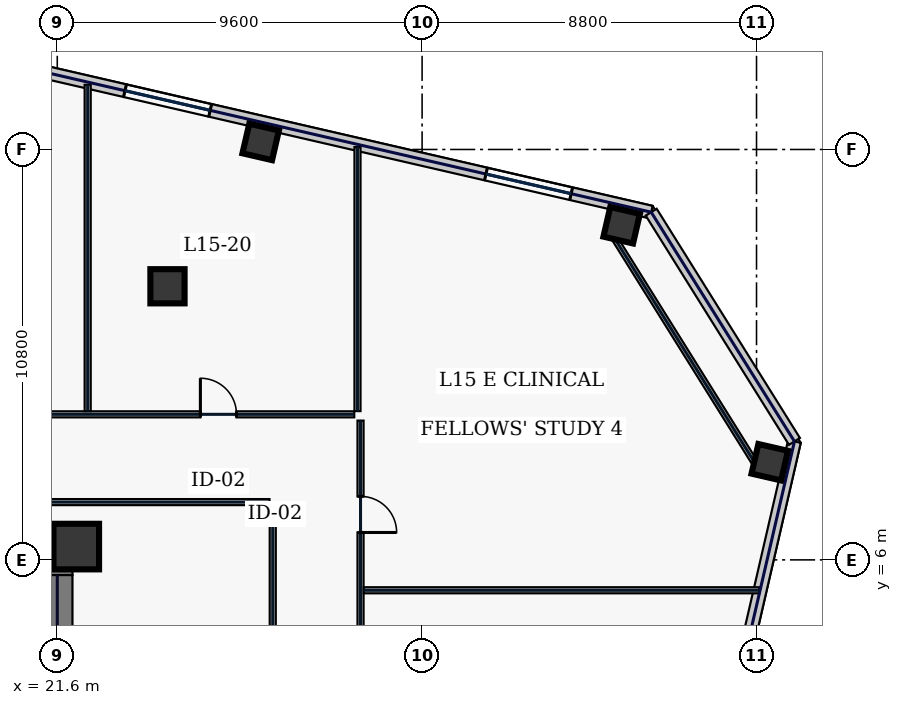
"""IFC4 building model, lengths in metres.
Left out: names, types, materials, properties, quantities, classifications, styles, units other than length and angle.
Written with IfcOpenShell. Run it as: python <this file> out.ifc"""

import sys

from ifc_helpers import new_model, si_unit, direction, frame, frame_2d, origin, origin_2d, place, context, subcontext, project, spatial, rectangle, hollow_rectangle, extrude, element, fill, save


model = new_model("IFC4")
c1 = context("Model", 3, precision=1e-05, world=origin(), true_north=direction((0.0, 1.0)))
c2 = subcontext(c1, "Body", "Model", "MODEL_VIEW")
j1 = project(units=[si_unit("LENGTHUNIT", "METRE"), si_unit("PLANEANGLEUNIT", "RADIAN")], contexts=[c1])
p1 = place(None, origin())
s1 = spatial("IfcSite", under=j1, at=p1, CompositionType="ELEMENT")
p2 = place(p1, origin())
s2 = spatial("IfcBuilding", under=s1, at=p2, CompositionType="ELEMENT")
p3 = place(p2, frame((0.0, 0.0, 71.4)))
s3 = spatial("IfcBuildingStorey", under=s2, at=p3, CompositionType="ELEMENT", Elevation=71.4)
p4 = place(p3, frame((10.4, 6.0, 0.0), z_axis=(0.0, 0.0, 1.0), x_axis=(1.0, 0.0, 0.0)))
e1 = element("IfcWall", 1, at=p4, inside=s3, PredefinedType="SHEAR", context=c2, shape_type="SweptSolid", body=[
    extrude(rectangle(XDim=11.6, YDim=0.8, at=frame_2d((5.8, 0.0))), origin(), (0.0, 0.0, 1.0), 3.74),
])
p5 = place(p3, frame((21.6, -5.6, 0.0), z_axis=(0.0, 0.0, 1.0), x_axis=(0.0, 1.0, 0.0)))
e2 = element("IfcWall", 2, at=p5, inside=s3, PredefinedType="SHEAR", context=c2, shape_type="SweptSolid", body=[
    extrude(rectangle(XDim=11.2, YDim=0.8, at=frame_2d((5.6, 0.0))), origin(), (0.0, 0.0, 1.0), 3.74),
])
p6 = place(p3, frame((22.1, 6.35, 0.0), z_axis=(0.0, 0.0, 1.0), x_axis=(1.0, 0.0, 0.0)))
e3 = element("IfcColumn", 3, at=p6, inside=s3, PredefinedType="COLUMN", context=c2, shape_type="SweptSolid", body=[
    extrude(hollow_rectangle(XDim=1.2, YDim=1.2, WallThickness=0.05, at=origin_2d()), origin(), (0.0, 0.0, 1.0), 3.74),
])
p7 = place(p3, frame((24.5, 13.2, 0.0), z_axis=(0.0, 0.0, 1.0), x_axis=(1.0, 0.0, 0.0)))
e4 = element("IfcColumn", 4, at=p7, inside=s3, PredefinedType="COLUMN", context=c2, shape_type="SweptSolid", body=[
    extrude(hollow_rectangle(XDim=0.9, YDim=0.9, WallThickness=0.04, at=origin_2d()), origin(), (0.0, 0.0, 1.0), 3.74),
])
for number, where, z_axis, x_axis in (
    (5, (36.451, 14.806, 0.0), (0.0, 0.0, 1.0), (0.974, -0.225, 0.0)),
    (6, (26.952, 16.999, 0.0), (0.0, 0.0, 1.0), (0.974, -0.225, 0.0)),
    (7, (40.348, 8.57, 0.0), (0.0, 0.0, 1.0), (0.974, -0.225, 0.0)),
):
    element("IfcColumn", number, at=place(p3, frame(where, z_axis=z_axis, x_axis=x_axis)), inside=s3, PredefinedType="COLUMN", context=c2, shape_type="SweptSolid", body=[
        extrude(hollow_rectangle(XDim=0.8, YDim=0.8, WallThickness=0.036, at=origin_2d()), origin(), (0.0, 0.0, 1.0), 3.74),
    ])
p8 = place(p3, frame((37.229, 15.15, 0.0), z_axis=(0.0, 0.0, 1.0), x_axis=(-0.974368689865, 0.224957009695, 0.0)))
e8 = element("IfcWall", 8, at=p8, inside=s3, PredefinedType="STANDARD", context=c2, shape_type="SweptSolid", body=[
    extrude(rectangle(XDim=19.75, YDim=0.34, at=frame_2d((9.875, 0.0))), origin(), (0.0, 0.0, 1.0), 3.74),
])
p9 = place(p8, frame((16.395, 0.0, 0.77)))
e9 = element("IfcOpeningElement", 9, at=p9, cuts=e8, PredefinedType="OPENING", context=c2, shape_type="SweptSolid", body=[
    extrude(rectangle(XDim=2.3, YDim=2.1, at=frame_2d((1.15, 1.05))), frame((0.0, 0.18, 0.0), z_axis=(0.0, -1.0, 0.0), x_axis=(1.0, 0.0, 0.0)), (0.0, 0.0, 1.0), 0.36),
])
p10 = place(p8, frame((11.911, 0.0, 0.77)))
e10 = element("IfcOpeningElement", 10, at=p10, cuts=e8, PredefinedType="OPENING", context=c2, shape_type="SweptSolid", body=[
    extrude(rectangle(XDim=2.3, YDim=2.1, at=frame_2d((1.15, 1.05))), frame((0.0, 0.18, 0.0), z_axis=(0.0, -1.0, 0.0), x_axis=(1.0, 0.0, 0.0)), (0.0, 0.0, 1.0), 0.36),
])
p11 = place(p8, frame((2.162, 0.0, 0.77)))
e11 = element("IfcOpeningElement", 11, at=p11, cuts=e8, PredefinedType="OPENING", context=c2, shape_type="SweptSolid", body=[
    extrude(rectangle(XDim=2.3, YDim=2.1, at=frame_2d((1.15, 1.05))), frame((0.0, 0.18, 0.0), z_axis=(0.0, -1.0, 0.0), x_axis=(1.0, 0.0, 0.0)), (0.0, 0.0, 1.0), 0.36),
])
p12 = place(p3, frame((31.82, -30.637, 0.0), z_axis=(0.0, 0.0, 1.0), x_axis=(0.224949969076, 0.974370315338, 0.0)))
e12 = element("IfcWall", 12, at=p12, inside=s3, PredefinedType="STANDARD", context=c2, shape_type="SweptSolid", body=[
    extrude(rectangle(XDim=40.8, YDim=0.34, at=frame_2d((20.4, 0.0))), origin(), (0.0, 0.0, 1.0), 3.74),
])
p13 = place(p12, frame((4.3, 0.0, 0.58)))
e13 = element("IfcOpeningElement", 13, at=p13, cuts=e12, PredefinedType="OPENING", context=c2, shape_type="SweptSolid", body=[
    extrude(rectangle(XDim=1.6, YDim=2.3, at=frame_2d((0.8, 1.15))), frame((0.0, 0.18, 0.0), z_axis=(0.0, -1.0, 0.0), x_axis=(1.0, 0.0, 0.0)), (0.0, 0.0, 1.0), 0.36),
])
p14 = place(p12, frame((14.5, 0.0, 0.58)))
e14 = element("IfcOpeningElement", 14, at=p14, cuts=e12, PredefinedType="OPENING", context=c2, shape_type="SweptSolid", body=[
    extrude(rectangle(XDim=1.6, YDim=2.3, at=frame_2d((0.8, 1.15))), frame((0.0, 0.18, 0.0), z_axis=(0.0, -1.0, 0.0), x_axis=(1.0, 0.0, 0.0)), (0.0, 0.0, 1.0), 0.36),
])
p15 = place(p12, frame((24.35, 0.0, 0.75)))
e15 = element("IfcOpeningElement", 15, at=p15, cuts=e12, PredefinedType="OPENING", context=c2, shape_type="SweptSolid", body=[
    extrude(rectangle(XDim=0.85, YDim=1.85, at=frame_2d((0.425, 0.925))), frame((0.0, 0.18, 0.0), z_axis=(0.0, -1.0, 0.0), x_axis=(1.0, 0.0, 0.0)), (0.0, 0.0, 1.0), 0.36),
])
p16 = place(p12, frame((34.55, 0.0, 0.75)))
e16 = element("IfcOpeningElement", 16, at=p16, cuts=e12, PredefinedType="OPENING", context=c2, shape_type="SweptSolid", body=[
    extrude(rectangle(XDim=0.85, YDim=1.85, at=frame_2d((0.425, 0.925))), frame((0.0, 0.18, 0.0), z_axis=(0.0, -1.0, 0.0), x_axis=(1.0, 0.0, 0.0)), (0.0, 0.0, 1.0), 0.36),
])
p17 = place(p3, frame((40.998, 9.117, 0.0), z_axis=(0.0, 0.0, 1.0), x_axis=(-0.529921811158, 0.848046504656, 0.0)))
e17 = element("IfcWall", 17, at=p17, inside=s3, PredefinedType="STANDARD", context=c2, shape_type="SweptSolid", body=[
    extrude(rectangle(XDim=7.113, YDim=0.34, at=frame_2d((3.557, 0.0))), origin(), (0.0, 0.0, 1.0), 3.74),
])
p18 = place(p3, frame((40.06, 8.389, 0.0), z_axis=(0.0, 0.0, 1.0), x_axis=(-0.529927317139, 0.848043064089, 0.0)))
e18 = element("IfcWall", 18, at=p18, inside=s3, PredefinedType="PARTITIONING", context=c2, shape_type="SweptSolid", body=[
    extrude(rectangle(XDim=7.354, YDim=0.16, at=frame_2d((3.677, 0.0))), origin(), (0.0, 0.0, 1.0), 3.74),
])
p19 = place(p3, frame((-29.415, 9.83, 0.0), z_axis=(0.0, 0.0, 1.0), x_axis=(1.0, 0.0, 0.0)))
e19 = element("IfcWall", 19, at=p19, inside=s3, PredefinedType="PARTITIONING", context=c2, shape_type="SweptSolid", body=[
    extrude(rectangle(XDim=58.83, YDim=0.16, at=frame_2d((29.415, 0.0))), origin(), (0.0, 0.0, 1.0), 3.74),
])
p20 = place(p19, frame((2.109, 0.0, 0.0)))
e20 = element("IfcOpeningElement", 20, at=p20, cuts=e19, PredefinedType="OPENING", context=c2, shape_type="SweptSolid", body=[
    extrude(rectangle(XDim=1.15, YDim=2.2, at=frame_2d((0.575, 1.1))), frame((0.0, 0.09, 0.0), z_axis=(0.0, -1.0, 0.0), x_axis=(1.0, 0.0, 0.0)), (0.0, 0.0, 1.0), 0.18),
])
p21 = place(p19, frame((6.245, 0.0, 0.0)))
e21 = element("IfcOpeningElement", 21, at=p21, cuts=e19, PredefinedType="OPENING", context=c2, shape_type="SweptSolid", body=[
    extrude(rectangle(XDim=0.95, YDim=2.2, at=frame_2d((0.475, 1.1))), frame((0.0, 0.09, 0.0), z_axis=(0.0, -1.0, 0.0), x_axis=(1.0, 0.0, 0.0)), (0.0, 0.0, 1.0), 0.18),
])
p22 = place(p19, frame((14.02, 0.0, 0.0)))
e22 = element("IfcOpeningElement", 22, at=p22, cuts=e19, PredefinedType="OPENING", context=c2, shape_type="SweptSolid", body=[
    extrude(rectangle(XDim=1.05, YDim=2.2, at=frame_2d((0.525, 1.1))), frame((0.0, 0.09, 0.0), z_axis=(0.0, -1.0, 0.0), x_axis=(1.0, 0.0, 0.0)), (0.0, 0.0, 1.0), 0.18),
])
p23 = place(p19, frame((25.24, 0.0, 0.0)))
e23 = element("IfcOpeningElement", 23, at=p23, cuts=e19, PredefinedType="OPENING", context=c2, shape_type="SweptSolid", body=[
    extrude(rectangle(XDim=0.95, YDim=2.2, at=frame_2d((0.475, 1.1))), frame((0.0, 0.09, 0.0), z_axis=(0.0, -1.0, 0.0), x_axis=(1.0, 0.0, 0.0)), (0.0, 0.0, 1.0), 0.18),
])
p24 = place(p19, frame((36.39, 0.0, 0.0)))
e24 = element("IfcOpeningElement", 24, at=p24, cuts=e19, PredefinedType="OPENING", context=c2, shape_type="SweptSolid", body=[
    extrude(rectangle(XDim=0.95, YDim=2.2, at=frame_2d((0.475, 1.1))), frame((0.0, 0.09, 0.0), z_axis=(0.0, -1.0, 0.0), x_axis=(1.0, 0.0, 0.0)), (0.0, 0.0, 1.0), 0.18),
])
p25 = place(p19, frame((46.79, 0.0, 0.0)))
e25 = element("IfcOpeningElement", 25, at=p25, cuts=e19, PredefinedType="OPENING", context=c2, shape_type="SweptSolid", body=[
    extrude(rectangle(XDim=0.95, YDim=2.2, at=frame_2d((0.475, 1.1))), frame((0.0, 0.09, 0.0), z_axis=(0.0, -1.0, 0.0), x_axis=(1.0, 0.0, 0.0)), (0.0, 0.0, 1.0), 0.18),
])
p26 = place(p19, frame((54.781, 0.0, 0.0)))
e26 = element("IfcOpeningElement", 26, at=p26, cuts=e19, PredefinedType="OPENING", context=c2, shape_type="SweptSolid", body=[
    extrude(rectangle(XDim=0.95, YDim=2.2, at=frame_2d((0.475, 1.1))), frame((0.0, 0.09, 0.0), z_axis=(0.0, -1.0, 0.0), x_axis=(1.0, 0.0, 0.0)), (0.0, 0.0, 1.0), 0.18),
])
p27 = place(p3, frame((29.58, 9.665, 0.0), z_axis=(0.0, 0.0, 1.0), x_axis=(0.0, -1.0, 0.0)))
e27 = element("IfcWall", 27, at=p27, inside=s3, PredefinedType="PARTITIONING", context=c2, shape_type="SweptSolid", body=[
    extrude(rectangle(XDim=19.28, YDim=0.16, at=frame_2d((9.64, 0.0))), origin(), (0.0, 0.0, 1.0), 3.74),
])
p28 = place(p27, frame((16.531, 0.0, 0.0)))
e28 = element("IfcOpeningElement", 28, at=p28, cuts=e27, PredefinedType="OPENING", context=c2, shape_type="SweptSolid", body=[
    extrude(rectangle(XDim=0.95, YDim=2.2, at=frame_2d((0.475, 1.1))), frame((0.0, 0.09, 0.0), z_axis=(0.0, -1.0, 0.0), x_axis=(1.0, 0.0, 0.0)), (0.0, 0.0, 1.0), 0.18),
])
p29 = place(p27, frame((11.25, 0.0, 0.0)))
e29 = element("IfcOpeningElement", 29, at=p29, cuts=e27, PredefinedType="OPENING", context=c2, shape_type="SweptSolid", body=[
    extrude(rectangle(XDim=0.95, YDim=2.2, at=frame_2d((0.475, 1.1))), frame((0.0, 0.09, 0.0), z_axis=(0.0, -1.0, 0.0), x_axis=(1.0, 0.0, 0.0)), (0.0, 0.0, 1.0), 0.18),
])
p30 = place(p27, frame((6.05, 0.0, 0.0)))
e30 = element("IfcOpeningElement", 30, at=p30, cuts=e27, PredefinedType="OPENING", context=c2, shape_type="SweptSolid", body=[
    extrude(rectangle(XDim=0.95, YDim=2.2, at=frame_2d((0.475, 1.1))), frame((0.0, 0.09, 0.0), z_axis=(0.0, -1.0, 0.0), x_axis=(1.0, 0.0, 0.0)), (0.0, 0.0, 1.0), 0.18),
])
p31 = place(p27, frame((1.994, 0.0, 0.0)))
e31 = element("IfcOpeningElement", 31, at=p31, cuts=e27, PredefinedType="OPENING", context=c2, shape_type="SweptSolid", body=[
    extrude(rectangle(XDim=0.95, YDim=2.2, at=frame_2d((0.475, 1.1))), frame((0.0, 0.09, 0.0), z_axis=(0.0, -1.0, 0.0), x_axis=(1.0, 0.0, 0.0)), (0.0, 0.0, 1.0), 0.18),
])
p32 = place(p3, frame((27.185, 7.52, 0.0), z_axis=(0.0, 0.0, 1.0), x_axis=(-1.0, 0.0, 0.0)))
e32 = element("IfcWall", 32, at=p32, inside=s3, PredefinedType="PARTITIONING", context=c2, shape_type="SweptSolid", body=[
    extrude(rectangle(XDim=16.52, YDim=0.16, at=frame_2d((8.26, 0.0))), origin(), (0.0, 0.0, 1.0), 3.74),
])
p33 = place(p3, frame((27.27, -7.385, 0.0), z_axis=(0.0, 0.0, 1.0), x_axis=(0.0, 1.0, 0.0)))
e33 = element("IfcWall", 33, at=p33, inside=s3, PredefinedType="PARTITIONING", context=c2, shape_type="SweptSolid", body=[
    extrude(rectangle(XDim=14.82, YDim=0.16, at=frame_2d((7.41, 0.0))), origin(), (0.0, 0.0, 1.0), 3.74),
])
p34 = place(p3, frame((29.5, 9.915, 0.0), z_axis=(0.0, 0.0, 1.0), x_axis=(0.0, 1.0, 0.0)))
e34 = element("IfcWall", 34, at=p34, inside=s3, PredefinedType="PARTITIONING", context=c2, shape_type="SweptSolid", body=[
    extrude(rectangle(XDim=6.947, YDim=0.16, at=frame_2d((3.474, 0.0))), origin(), (0.0, 0.0, 1.0), 3.74),
])
p35 = place(p3, frame((22.4, 9.915, 0.0), z_axis=(0.0, 0.0, 1.0), x_axis=(0.0, 1.0, 0.0)))
e35 = element("IfcWall", 35, at=p35, inside=s3, PredefinedType="PARTITIONING", context=c2, shape_type="SweptSolid", body=[
    extrude(rectangle(XDim=8.586, YDim=0.16, at=frame_2d((4.293, 0.0))), origin(), (0.0, 0.0, 1.0), 3.74),
])
p36 = place(p3, frame((29.665, 5.2, 0.0), z_axis=(0.0, 0.0, 1.0), x_axis=(1.0, 0.0, 0.0)))
e36 = element("IfcWall", 36, at=p36, inside=s3, PredefinedType="PARTITIONING", context=c2, shape_type="SweptSolid", body=[
    extrude(rectangle(XDim=10.408, YDim=0.16, at=frame_2d((5.204, 0.0))), origin(), (0.0, 0.0, 1.0), 3.74),
])
p37 = place(p10, origin())
e37 = element("IfcWindow", 37, at=p37, inside=s3, PartitioningType="SINGLE_PANEL", PredefinedType="WINDOW", context=c2, shape_type="SweptSolid", body=[
    extrude(rectangle(XDim=2.3, YDim=2.1, at=frame_2d((1.15, 1.05))), frame((0.0, 0.03, 0.0), z_axis=(0.0, -1.0, 0.0), x_axis=(1.0, 0.0, 0.0)), (0.0, 0.0, 1.0), 0.06),
])
fill(e10, e37)
p38 = place(p11, origin())
e38 = element("IfcWindow", 38, at=p38, inside=s3, PartitioningType="SINGLE_PANEL", PredefinedType="WINDOW", context=c2, shape_type="SweptSolid", body=[
    extrude(rectangle(XDim=2.3, YDim=2.1, at=frame_2d((1.15, 1.05))), frame((0.0, 0.03, 0.0), z_axis=(0.0, -1.0, 0.0), x_axis=(1.0, 0.0, 0.0)), (0.0, 0.0, 1.0), 0.06),
])
fill(e11, e38)
p39 = place(p26, origin())
e39 = element("IfcDoor", 39, at=p39, inside=s3, OperationType="SINGLE_SWING_LEFT", PredefinedType="DOOR", context=c2, shape_type="SweptSolid", body=[
    extrude(rectangle(XDim=0.95, YDim=2.2, at=frame_2d((0.475, 1.1))), frame((0.0, 0.025, 0.0), z_axis=(0.0, -1.0, 0.0), x_axis=(1.0, 0.0, 0.0)), (0.0, 0.0, 1.0), 0.05),
])
fill(e26, e39)
p40 = place(p31, origin())
e40 = element("IfcDoor", 40, at=p40, inside=s3, OperationType="SINGLE_SWING_RIGHT", PredefinedType="DOOR", context=c2, shape_type="SweptSolid", body=[
    extrude(rectangle(XDim=0.95, YDim=2.2, at=frame_2d((0.475, 1.1))), frame((0.0, 0.025, 0.0), z_axis=(0.0, -1.0, 0.0), x_axis=(1.0, 0.0, 0.0)), (0.0, 0.0, 1.0), 0.05),
])
fill(e31, e40)
save(model, sys.argv[1])
